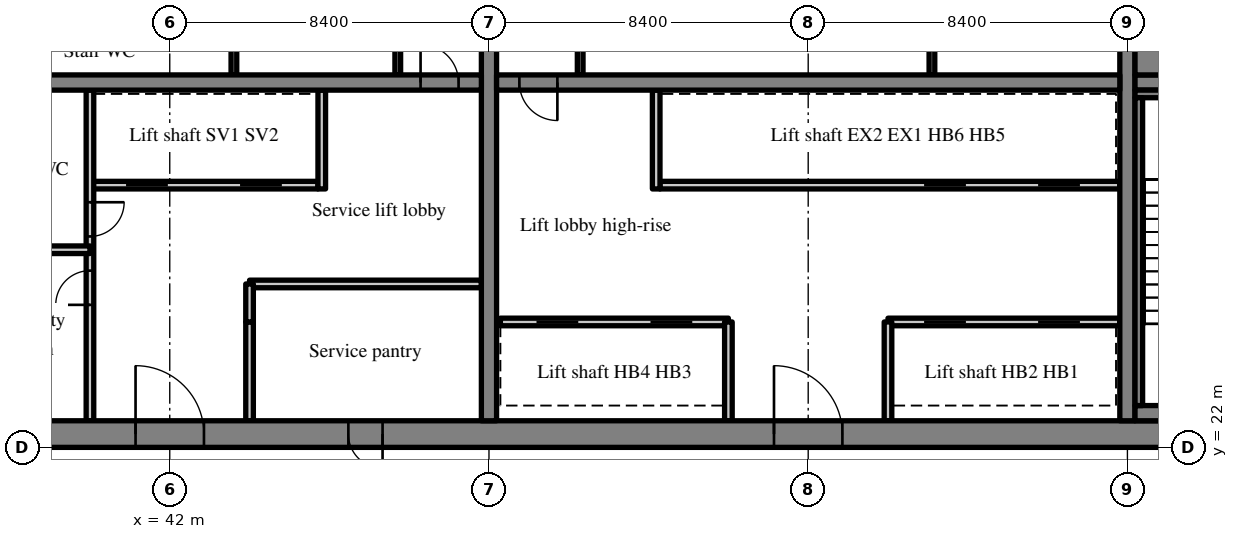
"""IFC4 building model, lengths in metres.
Left out: names, types, materials, properties, quantities, classifications, styles, units other than length and angle.
Written with IfcOpenShell. Run it as: python <this file> out.ifc"""

import sys

from ifc_helpers import new_model, si_unit, direction, frame, frame_2d, origin, place, context, subcontext, project, spatial, rectangle, extrude, source, transform, mapped, element, fill, save


model = new_model("IFC4")
c1 = context("Model", 3, precision=1e-05, world=origin(), true_north=direction((0.0, 1.0)))
c2 = subcontext(c1, "Body", "Model", "MODEL_VIEW")
j1 = project(units=[si_unit("LENGTHUNIT", "METRE"), si_unit("PLANEANGLEUNIT", "RADIAN")], contexts=[c1])
p1 = place(None, origin())
s1 = spatial("IfcSite", under=j1, at=p1, CompositionType="ELEMENT")
p2 = place(p1, origin())
s2 = spatial("IfcBuilding", under=s1, at=p2, CompositionType="ELEMENT")
p3 = place(p2, frame((0.0, 0.0, 189.6)))
s3 = spatial("IfcBuildingStorey", under=s2, at=p3, CompositionType="ELEMENT", Elevation=189.6)
m1 = source(origin(), c2, "Body", "SweptSolid", [
    extrude(rectangle(XDim=50.4, YDim=0.7, at=frame_2d((25.2, 0.0))), origin(), (0.0, 0.0, 1.0), 3.52),
])
p4 = place(p3, frame((25.2, 22.35, 0.0), z_axis=(0.0, 0.0, 1.0), x_axis=(1.0, 0.0, 0.0)))
e1 = element("IfcWall", 1, at=p4, inside=s3, PredefinedType="SHEAR", context=c2, shape_type="MappedRepresentation", body=[
    mapped(m1, transform((0.0, 0.0, 0.0), scale=1.0)),
])
m2 = source(origin(), c2, "Body", "SweptSolid", [
    extrude(rectangle(XDim=1.8, YDim=2.1, at=frame_2d((0.9, 1.05))), frame((0.0, 0.36, 0.0), z_axis=(0.0, -1.0, 0.0), x_axis=(1.0, 0.0, 0.0)), (0.0, 0.0, 1.0), 0.72),
])
p5 = place(p4, frame((15.9, 0.0, 0.0)))
e2 = element("IfcOpeningElement", 2, at=p5, cuts=e1, PredefinedType="OPENING", context=c2, shape_type="MappedRepresentation", body=[
    mapped(m2, transform((0.0, 0.0, 0.0), scale=1.0)),
])
m3 = source(origin(), c2, "Body", "SweptSolid", [
    extrude(rectangle(XDim=0.9, YDim=2.1, at=frame_2d((0.45, 1.05))), frame((0.0, 0.36, 0.0), z_axis=(0.0, -1.0, 0.0), x_axis=(1.0, 0.0, 0.0)), (0.0, 0.0, 1.0), 0.72),
])
p6 = place(p4, frame((9.7, 0.0, 0.0)))
e3 = element("IfcOpeningElement", 3, at=p6, cuts=e1, PredefinedType="OPENING", context=c2, shape_type="MappedRepresentation", body=[
    mapped(m3, transform((0.0, 0.0, 0.0), scale=1.0)),
])
p7 = place(p4, frame((21.5, 0.0, 0.0)))
e4 = element("IfcOpeningElement", 4, at=p7, cuts=e1, PredefinedType="OPENING", context=c2, shape_type="MappedRepresentation", body=[
    mapped(m3, transform((0.0, 0.0, 0.0), scale=1.0)),
])
p8 = place(p4, frame((32.7, 0.0, 0.0)))
e5 = element("IfcOpeningElement", 5, at=p8, cuts=e1, PredefinedType="OPENING", context=c2, shape_type="MappedRepresentation", body=[
    mapped(m2, transform((0.0, 0.0, 0.0), scale=1.0)),
])
m4 = source(origin(), c2, "Body", "SweptSolid", [
    extrude(rectangle(XDim=1.2, YDim=2.1, at=frame_2d((0.6, 1.05))), frame((0.0, 0.36, 0.0), z_axis=(0.0, -1.0, 0.0), x_axis=(1.0, 0.0, 0.0)), (0.0, 0.0, 1.0), 0.72),
])
p9 = place(p4, frame((6.475, 0.0, 0.0)))
e6 = element("IfcOpeningElement", 6, at=p9, cuts=e1, PredefinedType="OPENING", context=c2, shape_type="MappedRepresentation", body=[
    mapped(m4, transform((0.0, 0.0, 0.0), scale=1.0)),
])
p10 = place(p4, frame((47.875, 0.0, 0.0)))
e7 = element("IfcOpeningElement", 7, at=p10, cuts=e1, PredefinedType="OPENING", context=c2, shape_type="MappedRepresentation", body=[
    mapped(m4, transform((0.0, 0.0, 0.0), scale=1.0)),
])
m5 = source(origin(), c2, "Body", "SweptSolid", [
    extrude(rectangle(XDim=18.6, YDim=0.4, at=frame_2d((9.3, 0.0))), origin(), (0.0, 0.0, 1.0), 3.52),
])
p11 = place(p3, frame((50.4, 22.7, 0.0), z_axis=(0.0, 0.0, 1.0), x_axis=(0.0, 1.0, 0.0)))
e8 = element("IfcWall", 8, at=p11, inside=s3, PredefinedType="SHEAR", context=c2, shape_type="MappedRepresentation", body=[
    mapped(m5, transform((0.0, 0.0, 0.0), scale=1.0)),
])
m6 = source(origin(), c2, "Body", "SweptSolid", [
    extrude(rectangle(XDim=1.1, YDim=2.1, at=frame_2d((0.55, 1.05))), frame((0.0, 0.21, 0.0), z_axis=(0.0, -1.0, 0.0), x_axis=(1.0, 0.0, 0.0)), (0.0, 0.0, 1.0), 0.42),
])
p12 = place(p11, frame((12.75, 0.0, 0.0)))
e9 = element("IfcOpeningElement", 9, at=p12, cuts=e8, PredefinedType="OPENING", context=c2, shape_type="MappedRepresentation", body=[
    mapped(m6, transform((0.0, 0.0, 0.0), scale=1.0)),
])
p13 = place(p3, frame((67.2, 22.7, 0.0), z_axis=(0.0, 0.0, 1.0), x_axis=(0.0, 1.0, 0.0)))
e10 = element("IfcWall", 10, at=p13, inside=s3, PredefinedType="SHEAR", context=c2, shape_type="MappedRepresentation", body=[
    mapped(m5, transform((0.0, 0.0, 0.0), scale=1.0)),
])
m7 = source(origin(), c2, "Body", "SweptSolid", [
    extrude(rectangle(XDim=16.4, YDim=0.4, at=frame_2d((8.2, 0.0))), origin(), (0.0, 0.0, 1.0), 3.52),
])
p14 = place(p3, frame((33.8, 31.6, 0.0), z_axis=(0.0, 0.0, 1.0), x_axis=(1.0, 0.0, 0.0)))
e11 = element("IfcWall", 11, at=p14, inside=s3, PredefinedType="SHEAR", context=c2, shape_type="MappedRepresentation", body=[
    mapped(m7, transform((0.0, 0.0, 0.0), scale=1.0)),
])
m8 = source(origin(), c2, "Body", "SweptSolid", [
    extrude(rectangle(XDim=1.0, YDim=2.1, at=frame_2d((0.5, 1.05))), frame((0.0, 0.21, 0.0), z_axis=(0.0, -1.0, 0.0), x_axis=(1.0, 0.0, 0.0)), (0.0, 0.0, 1.0), 0.42),
])
p15 = place(p14, frame((14.8, 0.0, 0.0)))
e12 = element("IfcOpeningElement", 12, at=p15, cuts=e11, PredefinedType="OPENING", context=c2, shape_type="MappedRepresentation", body=[
    mapped(m8, transform((0.0, 0.0, 0.0), scale=1.0)),
])
p16 = place(p3, frame((50.6, 31.6, 0.0), z_axis=(0.0, 0.0, 1.0), x_axis=(1.0, 0.0, 0.0)))
e13 = element("IfcWall", 13, at=p16, inside=s3, PredefinedType="SHEAR", context=c2, shape_type="MappedRepresentation", body=[
    mapped(m7, transform((0.0, 0.0, 0.0), scale=1.0)),
])
p17 = place(p16, frame((0.6, 0.0, 0.0)))
e14 = element("IfcOpeningElement", 14, at=p17, cuts=e13, PredefinedType="OPENING", context=c2, shape_type="MappedRepresentation", body=[
    mapped(m8, transform((0.0, 0.0, 0.0), scale=1.0)),
])
m9 = source(origin(), c2, "Body", "SweptSolid", [
    extrude(rectangle(XDim=7.5, YDim=0.4, at=frame_2d((3.75, 0.0))), origin(), (0.0, 0.0, 1.0), 3.52),
])
p18 = place(p3, frame((67.4, 31.6, 0.0), z_axis=(0.0, 0.0, 1.0), x_axis=(1.0, 0.0, 0.0)))
e15 = element("IfcWall", 15, at=p18, inside=s3, PredefinedType="SHEAR", context=c2, shape_type="MappedRepresentation", body=[
    mapped(m9, transform((0.0, 0.0, 0.0), scale=1.0)),
])
p19 = place(p18, frame((5.725, 0.0, 0.0)))
e16 = element("IfcOpeningElement", 16, at=p19, cuts=e15, PredefinedType="OPENING", context=c2, shape_type="MappedRepresentation", body=[
    mapped(m6, transform((0.0, 0.0, 0.0), scale=1.0)),
])
m10 = source(origin(), c2, "Body", "SweptSolid", [
    extrude(rectangle(XDim=6.0, YDim=0.2, at=frame_2d((3.0, 0.0))), origin(), (0.0, 0.0, 1.0), 3.52),
])
p20 = place(p3, frame((39.9, 28.9, 0.0), z_axis=(0.0, 0.0, 1.0), x_axis=(1.0, 0.0, 0.0)))
e17 = element("IfcWall", 17, at=p20, inside=s3, PredefinedType="SOLIDWALL", context=c2, shape_type="MappedRepresentation", body=[
    mapped(m10, transform((0.0, 0.0, 0.0), scale=1.0)),
])
m11 = source(origin(), c2, "Body", "SweptSolid", [
    extrude(rectangle(XDim=1.1, YDim=2.1, at=frame_2d((0.55, 1.05))), frame((0.0, 0.11, 0.0), z_axis=(0.0, -1.0, 0.0), x_axis=(1.0, 0.0, 0.0)), (0.0, 0.0, 1.0), 0.22),
])
p21 = place(p20, frame((0.95, 0.0, 0.0)))
e18 = element("IfcOpeningElement", 18, at=p21, cuts=e17, PredefinedType="OPENING", context=c2, shape_type="MappedRepresentation", body=[
    mapped(m11, transform((0.0, 0.0, 0.0), scale=1.0)),
])
p22 = place(p20, frame((3.95, 0.0, 0.0)))
e19 = element("IfcOpeningElement", 19, at=p22, cuts=e17, PredefinedType="OPENING", context=c2, shape_type="MappedRepresentation", body=[
    mapped(m11, transform((0.0, 0.0, 0.0), scale=1.0)),
])
m12 = source(origin(), c2, "Body", "SweptSolid", [
    extrude(rectangle(XDim=8.7, YDim=0.2, at=frame_2d((4.35, 0.0))), origin(), (0.0, 0.0, 1.0), 3.52),
])
p23 = place(p3, frame((39.9, 22.7, 0.0), z_axis=(0.0, 0.0, 1.0), x_axis=(0.0, 1.0, 0.0)))
e20 = element("IfcWall", 20, at=p23, inside=s3, PredefinedType="PARTITIONING", context=c2, shape_type="MappedRepresentation", body=[
    mapped(m12, transform((0.0, 0.0, 0.0), scale=1.0)),
])
m13 = source(origin(), c2, "Body", "SweptSolid", [
    extrude(rectangle(XDim=0.9, YDim=2.1, at=frame_2d((0.45, 1.05))), frame((0.0, 0.11, 0.0), z_axis=(0.0, -1.0, 0.0), x_axis=(1.0, 0.0, 0.0)), (0.0, 0.0, 1.0), 0.22),
])
p24 = place(p23, frame((3.05, 0.0, 0.0)))
e21 = element("IfcOpeningElement", 21, at=p24, cuts=e20, PredefinedType="OPENING", context=c2, shape_type="MappedRepresentation", body=[
    mapped(m13, transform((0.0, 0.0, 0.0), scale=1.0)),
])
p25 = place(p23, frame((4.85, 0.0, 0.0)))
e22 = element("IfcOpeningElement", 22, at=p25, cuts=e20, PredefinedType="OPENING", context=c2, shape_type="MappedRepresentation", body=[
    mapped(m13, transform((0.0, 0.0, 0.0), scale=1.0)),
])
m14 = source(origin(), c2, "Body", "SweptSolid", [
    extrude(rectangle(XDim=2.6, YDim=0.2, at=frame_2d((1.3, 0.0))), origin(), (0.0, 0.0, 1.0), 3.52),
])
p26 = place(p3, frame((44.1, 22.7, 0.0), z_axis=(0.0, 0.0, 1.0), x_axis=(0.0, 1.0, 0.0)))
e23 = element("IfcWall", 23, at=p26, inside=s3, PredefinedType="PARTITIONING", context=c2, shape_type="MappedRepresentation", body=[
    mapped(m14, transform((0.0, 0.0, 0.0), scale=1.0)),
])
m15 = source(origin(), c2, "Body", "SweptSolid", [
    extrude(rectangle(XDim=2.6, YDim=0.2, at=frame_2d((1.3, 0.0))), origin(), (0.0, 0.0, 1.0), 3.52),
])
p27 = place(p3, frame((46.0, 28.8, 0.0), z_axis=(0.0, 0.0, 1.0), x_axis=(0.0, 1.0, 0.0)))
e24 = element("IfcWall", 24, at=p27, inside=s3, PredefinedType="SOLIDWALL", context=c2, shape_type="MappedRepresentation", body=[
    mapped(m15, transform((0.0, 0.0, 0.0), scale=1.0)),
])
m16 = source(origin(), c2, "Body", "SweptSolid", [
    extrude(rectangle(XDim=3.0, YDim=0.2, at=frame_2d((1.5, 0.0))), origin(), (0.0, 0.0, 1.0), 3.52),
])
p28 = place(p3, frame((36.9, 27.2, 0.0), z_axis=(0.0, 0.0, 1.0), x_axis=(1.0, 0.0, 0.0)))
e25 = element("IfcWall", 25, at=p28, inside=s3, PredefinedType="PARTITIONING", context=c2, shape_type="MappedRepresentation", body=[
    mapped(m16, transform((0.0, 0.0, 0.0), scale=1.0)),
])
m17 = source(origin(), c2, "Body", "SweptSolid", [
    extrude(rectangle(XDim=6.1, YDim=0.2, at=frame_2d((3.05, 0.0))), origin(), (0.0, 0.0, 1.0), 3.52),
])
p29 = place(p3, frame((44.1, 26.3, 0.0), z_axis=(0.0, 0.0, 1.0), x_axis=(1.0, 0.0, 0.0)))
e26 = element("IfcWall", 26, at=p29, inside=s3, PredefinedType="PARTITIONING", context=c2, shape_type="MappedRepresentation", body=[
    mapped(m17, transform((0.0, 0.0, 0.0), scale=1.0)),
])
m18 = source(origin(), c2, "Body", "SweptSolid", [
    extrude(rectangle(XDim=1.0, YDim=0.2, at=frame_2d((0.5, 0.0))), origin(), (0.0, 0.0, 1.0), 3.52),
])
p30 = place(p3, frame((44.1, 25.3, 0.0), z_axis=(0.0, 0.0, 1.0), x_axis=(0.0, 1.0, 0.0)))
e27 = element("IfcWall", 27, at=p30, inside=s3, PredefinedType="PARTITIONING", context=c2, shape_type="MappedRepresentation", body=[
    mapped(m18, transform((0.0, 0.0, 0.0), scale=1.0)),
])
m19 = source(origin(), c2, "Body", "SweptSolid", [
    extrude(rectangle(XDim=3.2, YDim=0.15, at=frame_2d((1.6, 0.0))), origin(), (0.0, 0.0, 1.0), 3.52),
])
for number, where, z_axis, x_axis in (
    (28, (48.0, 31.8, 0.0), (0.0, 0.0, 1.0), (0.0, 1.0, 0.0)),
    (29, (43.688, 31.8, 0.0), (0.0, 0.0, 1.0), (0.0, 1.0, 0.0)),
):
    element("IfcWall", number, at=place(p3, frame(where, z_axis=z_axis, x_axis=x_axis)), inside=s3, PredefinedType="PARTITIONING", context=c2, shape_type="MappedRepresentation", body=[
        mapped(m19, transform((0.0, 0.0, 0.0), scale=1.0)),
    ])
m20 = source(origin(), c2, "Body", "SweptSolid", [
    extrude(rectangle(XDim=6.1, YDim=0.2, at=frame_2d((3.05, 0.0))), origin(), (0.0, 0.0, 1.0), 3.52),
])
p31 = place(p3, frame((67.0, 25.3, 0.0), z_axis=(0.0, 0.0, 1.0), x_axis=(-1.0, 0.0, 0.0)))
e30 = element("IfcWall", 30, at=p31, inside=s3, PredefinedType="SOLIDWALL", context=c2, shape_type="MappedRepresentation", body=[
    mapped(m20, transform((0.0, 0.0, 0.0), scale=1.0)),
])
p32 = place(p31, frame((1.05, 0.0, 0.0)))
e31 = element("IfcOpeningElement", 31, at=p32, cuts=e30, PredefinedType="OPENING", context=c2, shape_type="MappedRepresentation", body=[
    mapped(m11, transform((0.0, 0.0, 0.0), scale=1.0)),
])
p33 = place(p31, frame((4.05, 0.0, 0.0)))
e32 = element("IfcOpeningElement", 32, at=p33, cuts=e30, PredefinedType="OPENING", context=c2, shape_type="MappedRepresentation", body=[
    mapped(m11, transform((0.0, 0.0, 0.0), scale=1.0)),
])
p34 = place(p3, frame((56.7, 25.3, 0.0), z_axis=(0.0, 0.0, 1.0), x_axis=(-1.0, 0.0, 0.0)))
e33 = element("IfcWall", 33, at=p34, inside=s3, PredefinedType="SOLIDWALL", context=c2, shape_type="MappedRepresentation", body=[
    mapped(m10, transform((0.0, 0.0, 0.0), scale=1.0)),
])
p35 = place(p34, frame((0.95, 0.0, 0.0)))
e34 = element("IfcOpeningElement", 34, at=p35, cuts=e33, PredefinedType="OPENING", context=c2, shape_type="MappedRepresentation", body=[
    mapped(m11, transform((0.0, 0.0, 0.0), scale=1.0)),
])
p36 = place(p34, frame((3.95, 0.0, 0.0)))
e35 = element("IfcOpeningElement", 35, at=p36, cuts=e33, PredefinedType="OPENING", context=c2, shape_type="MappedRepresentation", body=[
    mapped(m11, transform((0.0, 0.0, 0.0), scale=1.0)),
])
m21 = source(origin(), c2, "Body", "SweptSolid", [
    extrude(rectangle(XDim=12.1, YDim=0.2, at=frame_2d((6.05, 0.0))), origin(), (0.0, 0.0, 1.0), 3.52),
])
p37 = place(p3, frame((67.0, 28.9, 0.0), z_axis=(0.0, 0.0, 1.0), x_axis=(-1.0, 0.0, 0.0)))
e36 = element("IfcWall", 36, at=p37, inside=s3, PredefinedType="SOLIDWALL", context=c2, shape_type="MappedRepresentation", body=[
    mapped(m21, transform((0.0, 0.0, 0.0), scale=1.0)),
])
p38 = place(p37, frame((1.05, 0.0, 0.0)))
e37 = element("IfcOpeningElement", 37, at=p38, cuts=e36, PredefinedType="OPENING", context=c2, shape_type="MappedRepresentation", body=[
    mapped(m11, transform((0.0, 0.0, 0.0), scale=1.0)),
])
p39 = place(p37, frame((4.05, 0.0, 0.0)))
e38 = element("IfcOpeningElement", 38, at=p39, cuts=e36, PredefinedType="OPENING", context=c2, shape_type="MappedRepresentation", body=[
    mapped(m11, transform((0.0, 0.0, 0.0), scale=1.0)),
])
for number, where, z_axis, x_axis in (
    (39, (60.9, 22.7, 0.0), (0.0, 0.0, 1.0), (0.0, 1.0, 0.0)),
    (40, (56.7, 22.7, 0.0), (0.0, 0.0, 1.0), (0.0, 1.0, 0.0)),
):
    element("IfcWall", number, at=place(p3, frame(where, z_axis=z_axis, x_axis=x_axis)), inside=s3, PredefinedType="SOLIDWALL", context=c2, shape_type="MappedRepresentation", body=[
        mapped(m14, transform((0.0, 0.0, 0.0), scale=1.0)),
    ])
p40 = place(p3, frame((54.8, 28.8, 0.0), z_axis=(0.0, 0.0, 1.0), x_axis=(0.0, 1.0, 0.0)))
e41 = element("IfcWall", 41, at=p40, inside=s3, PredefinedType="SOLIDWALL", context=c2, shape_type="MappedRepresentation", body=[
    mapped(m15, transform((0.0, 0.0, 0.0), scale=1.0)),
])
for number, where, z_axis, x_axis in (
    (42, (52.8, 31.8, 0.0), (0.0, 0.0, 1.0), (0.0, 1.0, 0.0)),
    (43, (62.056, 31.8, 0.0), (0.0, 0.0, 1.0), (0.0, 1.0, 0.0)),
):
    element("IfcWall", number, at=place(p3, frame(where, z_axis=z_axis, x_axis=x_axis)), inside=s3, PredefinedType="PARTITIONING", context=c2, shape_type="MappedRepresentation", body=[
        mapped(m19, transform((0.0, 0.0, 0.0), scale=1.0)),
    ])
m22 = source(origin(), c2, "Body", "SweptSolid", [
    extrude(rectangle(XDim=4.85, YDim=0.4, at=frame_2d((2.425, 0.0))), origin(), (0.0, 0.0, 1.0), 3.52),
])
p41 = place(p3, frame((67.4, 22.9, 0.0), z_axis=(0.0, 0.0, 1.0), x_axis=(1.0, 0.0, 0.0)))
e44 = element("IfcWall", 44, at=p41, inside=s3, PredefinedType="SOLIDWALL", context=c2, shape_type="MappedRepresentation", body=[
    mapped(m22, transform((0.0, 0.0, 0.0), scale=1.0)),
])
m23 = source(origin(), c2, "Body", "SweptSolid", [
    extrude(rectangle(XDim=4.85, YDim=0.2, at=frame_2d((2.425, 0.0))), origin(), (0.0, 0.0, 1.0), 3.52),
])
p42 = place(p3, frame((67.4, 31.3, 0.0), z_axis=(0.0, 0.0, 1.0), x_axis=(1.0, 0.0, 0.0)))
e45 = element("IfcWall", 45, at=p42, inside=s3, PredefinedType="SOLIDWALL", context=c2, shape_type="MappedRepresentation", body=[
    mapped(m23, transform((0.0, 0.0, 0.0), scale=1.0)),
])
m24 = source(origin(), c2, "Body", "SweptSolid", [
    extrude(rectangle(XDim=8.1, YDim=0.2, at=frame_2d((4.05, 0.0))), origin(), (0.0, 0.0, 1.0), 3.52),
])
p43 = place(p3, frame((67.5, 23.1, 0.0), z_axis=(0.0, 0.0, 1.0), x_axis=(0.0, 1.0, 0.0)))
e46 = element("IfcWall", 46, at=p43, inside=s3, PredefinedType="SOLIDWALL", context=c2, shape_type="MappedRepresentation", body=[
    mapped(m24, transform((0.0, 0.0, 0.0), scale=1.0)),
])
m25 = source(origin(), c2, "Body", "SweptSolid", [
    extrude(rectangle(XDim=4.85, YDim=1.0, at=frame_2d((2.425, 0.0))), origin(), (0.0, 0.0, 1.0), 3.52),
])
p44 = place(p3, frame((67.4, 32.3, 0.0), z_axis=(0.0, 0.0, 1.0), x_axis=(1.0, 0.0, 0.0)))
e47 = element("IfcWall", 47, at=p44, inside=s3, PredefinedType="SOLIDWALL", context=c2, shape_type="MappedRepresentation", body=[
    mapped(m25, transform((0.0, 0.0, 0.0), scale=1.0)),
])
m26 = source(origin(), c2, "Body", "SweptSolid", [
    extrude(rectangle(XDim=1.8, YDim=2.1, at=frame_2d((0.9, 1.05))), frame((0.0, 0.275, 0.0), z_axis=(0.0, -1.0, 0.0), x_axis=(1.0, 0.0, 0.0)), (0.0, 0.0, 1.0), 0.05),
])
p45 = place(p5, origin())
e48 = element("IfcDoor", 48, at=p45, inside=s3, OperationType="DOUBLE_DOOR_SINGLE_SWING", PredefinedType="DOOR", context=c2, shape_type="MappedRepresentation", body=[
    mapped(m26, transform((0.0, 0.0, 0.0), scale=1.0)),
])
fill(e2, e48)
m27 = source(origin(), c2, "Body", "SweptSolid", [
    extrude(rectangle(XDim=1.0, YDim=2.1, at=frame_2d((0.5, 1.05))), frame((0.0, 0.025, 0.0), z_axis=(0.0, -1.0, 0.0), x_axis=(1.0, 0.0, 0.0)), (0.0, 0.0, 1.0), 0.05),
])
p46 = place(p15, origin())
e49 = element("IfcDoor", 49, at=p46, inside=s3, OperationType="SINGLE_SWING_LEFT", PredefinedType="DOOR", context=c2, shape_type="MappedRepresentation", body=[
    mapped(m27, transform((0.0, 0.0, 0.0), scale=1.0)),
])
fill(e12, e49)
m28 = source(origin(), c2, "Body", "SweptSolid", [
    extrude(rectangle(XDim=1.1, YDim=2.1, at=frame_2d((0.55, 1.05))), frame((0.0, 0.025, 0.0), z_axis=(0.0, -1.0, 0.0), x_axis=(1.0, 0.0, 0.0)), (0.0, 0.0, 1.0), 0.05),
])
p47 = place(p21, origin())
e50 = element("IfcDoor", 50, at=p47, inside=s3, OperationType="SLIDING_TO_LEFT", PredefinedType="DOOR", context=c2, shape_type="MappedRepresentation", body=[
    mapped(m28, transform((0.0, 0.0, 0.0), scale=1.0)),
])
fill(e18, e50)
p48 = place(p22, origin())
e51 = element("IfcDoor", 51, at=p48, inside=s3, OperationType="SLIDING_TO_RIGHT", PredefinedType="DOOR", context=c2, shape_type="MappedRepresentation", body=[
    mapped(m28, transform((0.0, 0.0, 0.0), scale=1.0)),
])
fill(e19, e51)
m29 = source(origin(), c2, "Body", "SweptSolid", [
    extrude(rectangle(XDim=0.9, YDim=2.1, at=frame_2d((0.45, 1.05))), frame((0.0, 0.025, 0.0), z_axis=(0.0, -1.0, 0.0), x_axis=(1.0, 0.0, 0.0)), (0.0, 0.0, 1.0), 0.05),
])
p49 = place(p24, origin())
e52 = element("IfcDoor", 52, at=p49, inside=s3, OperationType="SINGLE_SWING_LEFT", PredefinedType="DOOR", context=c2, shape_type="MappedRepresentation", body=[
    mapped(m29, transform((0.0, 0.0, 0.0), scale=1.0)),
])
fill(e21, e52)
p50 = place(p25, origin())
e53 = element("IfcDoor", 53, at=p50, inside=s3, OperationType="SINGLE_SWING_RIGHT", PredefinedType="DOOR", context=c2, shape_type="MappedRepresentation", body=[
    mapped(m29, transform((0.0, 0.0, 0.0), scale=1.0)),
])
fill(e22, e53)
m30 = source(origin(), c2, "Body", "SweptSolid", [
    extrude(rectangle(XDim=0.9, YDim=2.1, at=frame_2d((0.45, 1.05))), frame((0.0, 0.275, 0.0), z_axis=(0.0, -1.0, 0.0), x_axis=(1.0, 0.0, 0.0)), (0.0, 0.0, 1.0), 0.05),
])
p51 = place(p7, origin())
e54 = element("IfcDoor", 54, at=p51, inside=s3, OperationType="SINGLE_SWING_RIGHT", PredefinedType="DOOR", context=c2, shape_type="MappedRepresentation", body=[
    mapped(m30, transform((0.0, 0.0, 0.0), scale=1.0)),
])
fill(e4, e54)
p52 = place(p8, origin())
e55 = element("IfcDoor", 55, at=p52, inside=s3, OperationType="DOUBLE_DOOR_SINGLE_SWING", PredefinedType="DOOR", context=c2, shape_type="MappedRepresentation", body=[
    mapped(m26, transform((0.0, 0.0, 0.0), scale=1.0)),
])
fill(e5, e55)
p53 = place(p17, origin())
e56 = element("IfcDoor", 56, at=p53, inside=s3, OperationType="SINGLE_SWING_RIGHT", PredefinedType="DOOR", context=c2, shape_type="MappedRepresentation", body=[
    mapped(m27, transform((0.0, 0.0, 0.0), scale=1.0)),
])
fill(e14, e56)
p54 = place(p32, origin())
e57 = element("IfcDoor", 57, at=p54, inside=s3, OperationType="SLIDING_TO_RIGHT", PredefinedType="DOOR", context=c2, shape_type="MappedRepresentation", body=[
    mapped(m28, transform((0.0, 0.0, 0.0), scale=1.0)),
])
fill(e31, e57)
p55 = place(p33, origin())
e58 = element("IfcDoor", 58, at=p55, inside=s3, OperationType="SLIDING_TO_LEFT", PredefinedType="DOOR", context=c2, shape_type="MappedRepresentation", body=[
    mapped(m28, transform((0.0, 0.0, 0.0), scale=1.0)),
])
fill(e32, e58)
p56 = place(p35, origin())
e59 = element("IfcDoor", 59, at=p56, inside=s3, OperationType="SLIDING_TO_RIGHT", PredefinedType="DOOR", context=c2, shape_type="MappedRepresentation", body=[
    mapped(m28, transform((0.0, 0.0, 0.0), scale=1.0)),
])
fill(e34, e59)
p57 = place(p36, origin())
e60 = element("IfcDoor", 60, at=p57, inside=s3, OperationType="SLIDING_TO_LEFT", PredefinedType="DOOR", context=c2, shape_type="MappedRepresentation", body=[
    mapped(m28, transform((0.0, 0.0, 0.0), scale=1.0)),
])
fill(e35, e60)
p58 = place(p38, origin())
e61 = element("IfcDoor", 61, at=p58, inside=s3, OperationType="SLIDING_TO_RIGHT", PredefinedType="DOOR", context=c2, shape_type="MappedRepresentation", body=[
    mapped(m28, transform((0.0, 0.0, 0.0), scale=1.0)),
])
fill(e37, e61)
p59 = place(p39, origin())
e62 = element("IfcDoor", 62, at=p59, inside=s3, OperationType="SLIDING_TO_LEFT", PredefinedType="DOOR", context=c2, shape_type="MappedRepresentation", body=[
    mapped(m28, transform((0.0, 0.0, 0.0), scale=1.0)),
])
fill(e38, e62)
save(model, sys.argv[1])
